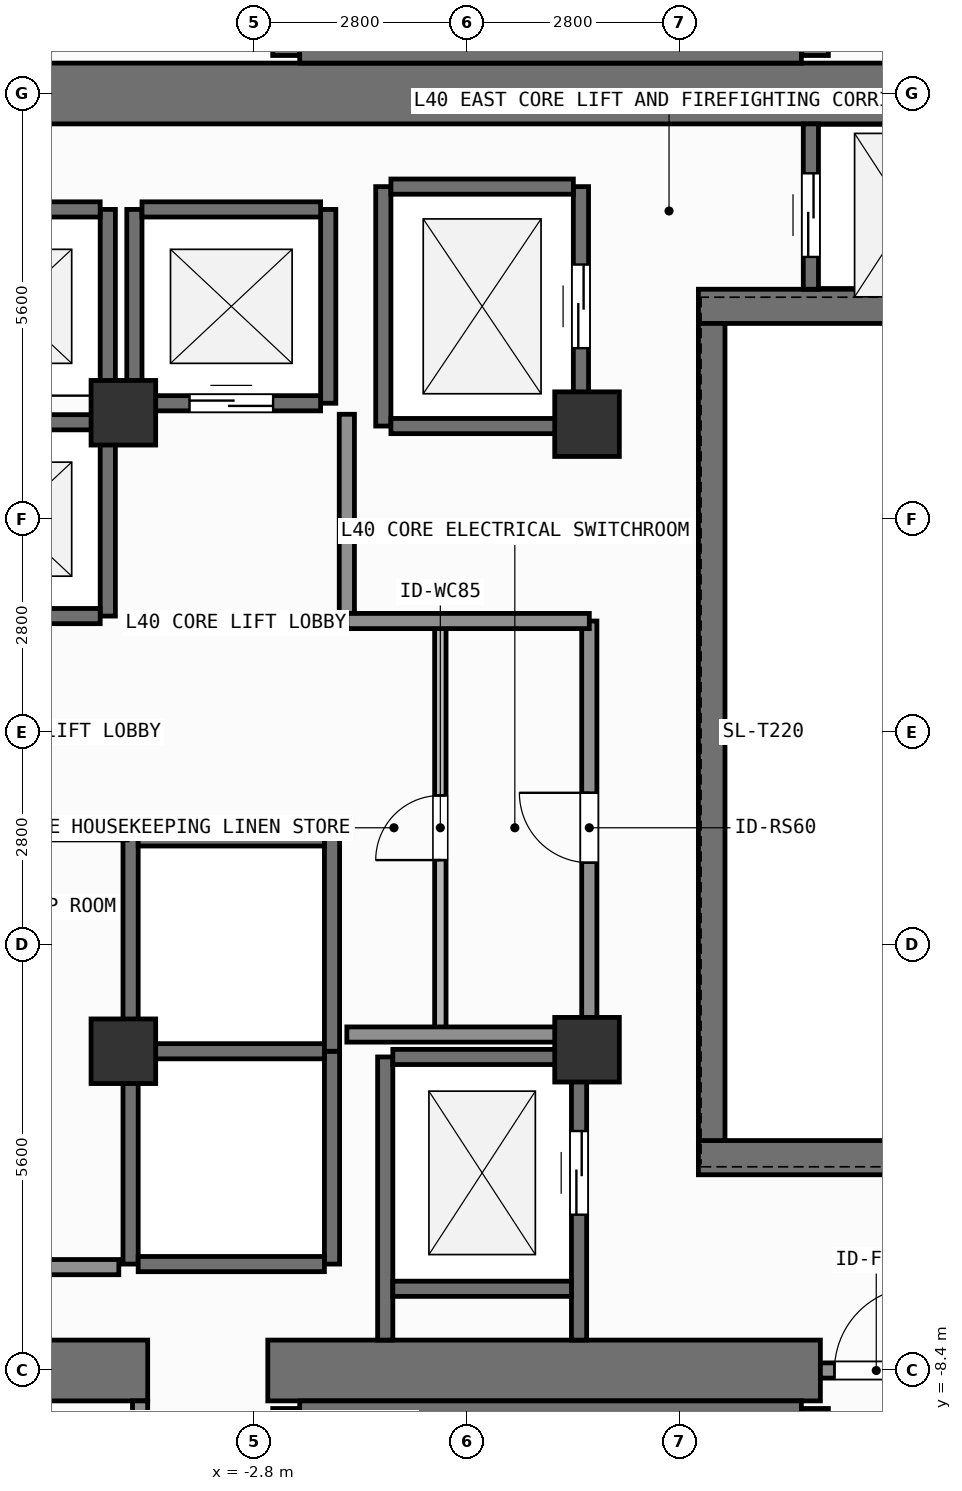
"""IFC4 building model, lengths in metres.
Left out: names, types, materials, properties, quantities, classifications, styles, units other than length and angle.
Written with IfcOpenShell. Run it as: python <this file> out.ifc"""

import sys

from ifc_helpers import new_model, si_unit, direction, frame, frame_2d, origin, origin_2d, place, context, subcontext, project, spatial, rectangle, extrude, element, fill, save


model = new_model("IFC4")
c1 = context("Model", 3, precision=1e-05, world=origin(), true_north=direction((0.0, 1.0)))
c2 = subcontext(c1, "Body", "Model", "MODEL_VIEW")
j1 = project(units=[si_unit("LENGTHUNIT", "METRE"), si_unit("PLANEANGLEUNIT", "RADIAN")], contexts=[c1])
p1 = place(None, origin())
s1 = spatial("IfcSite", under=j1, at=p1, CompositionType="ELEMENT")
p2 = place(p1, origin())
s2 = spatial("IfcBuilding", under=s1, at=p2, CompositionType="ELEMENT")
p3 = place(p2, frame((0.0, 0.0, 164.1)))
s3 = spatial("IfcBuildingStorey", under=s2, at=p3, CompositionType="ELEMENT", Elevation=164.1)
p4 = place(p3, frame((-7.55, -8.4, 0.0), z_axis=(0.0, 0.0, 1.0), x_axis=(1.0, 0.0, 0.0)))
e1 = element("IfcWall", 1, at=p4, inside=s3, PredefinedType="SHEAR", context=c2, shape_type="SweptSolid", body=[
    extrude(rectangle(XDim=3.35, YDim=0.8, at=frame_2d((1.675, 0.0))), origin(), (0.0, 0.0, 1.0), 3.9),
])
p5 = place(p3, frame((-2.62, -8.4, 0.0), z_axis=(0.0, 0.0, 1.0), x_axis=(1.0, 0.0, 0.0)))
e2 = element("IfcWall", 2, at=p5, inside=s3, PredefinedType="SHEAR", context=c2, shape_type="SweptSolid", body=[
    extrude(rectangle(XDim=7.27, YDim=0.8, at=frame_2d((3.635, 0.0))), origin(), (0.0, 0.0, 1.0), 3.9),
])
p6 = place(p3, frame((-7.55, 8.4, 0.0), z_axis=(0.0, 0.0, 1.0), x_axis=(1.0, 0.0, 0.0)))
e3 = element("IfcWall", 3, at=p6, inside=s3, PredefinedType="SHEAR", context=c2, shape_type="SweptSolid", body=[
    extrude(rectangle(XDim=16.35, YDim=0.8, at=frame_2d((8.175, 0.0))), origin(), (0.0, 0.0, 1.0), 3.9),
])
for number, where, z_axis, x_axis in (
    (4, (3.045, -5.6, 0.0), (0.0, 0.0, 1.0), (1.0, 0.0, 0.0)),
    (5, (3.045, 5.6, 0.0), (0.0, 0.0, 1.0), (1.0, 0.0, 0.0)),
):
    element("IfcWall", number, at=place(p3, frame(where, z_axis=z_axis, x_axis=x_axis)), inside=s3, PredefinedType="SHEAR", context=c2, shape_type="SweptSolid", body=[
        extrude(rectangle(XDim=5.755, YDim=0.45, at=frame_2d((2.877, 0.0))), origin(), (0.0, 0.0, 1.0), 3.9),
    ])
p7 = place(p3, frame((3.22, -5.375, 0.0), z_axis=(0.0, 0.0, 1.0), x_axis=(0.0, 1.0, 0.0)))
e6 = element("IfcWall", 6, at=p7, inside=s3, PredefinedType="SHEAR", context=c2, shape_type="SweptSolid", body=[
    extrude(rectangle(XDim=10.75, YDim=0.35, at=frame_2d((5.375, 0.0))), origin(), (0.0, 0.0, 1.0), 3.9),
])
p8 = place(p3, frame((-2.2, -8.913, 0.0), z_axis=(0.0, 0.0, 1.0), x_axis=(1.0, 0.0, 0.0)))
e7 = element("IfcWall", 7, at=p8, inside=s3, PredefinedType="SHEAR", context=c2, shape_type="SweptSolid", body=[
    extrude(rectangle(XDim=6.6, YDim=0.225, at=frame_2d((3.3, 0.0))), origin(), (0.0, 0.0, 1.0), 3.9),
])
p9 = place(p3, frame((-2.38, -11.825, 0.0), z_axis=(0.0, 0.0, 1.0), x_axis=(0.0, 1.0, 0.0)))
e8 = element("IfcWall", 8, at=p9, inside=s3, PredefinedType="SHEAR", context=c2, shape_type="SweptSolid", body=[
    extrude(rectangle(XDim=2.925, YDim=0.35, at=frame_2d((1.462, 0.0))), origin(), (0.0, 0.0, 1.0), 3.9),
])
p10 = place(p3, frame((4.58, -8.9, 0.0), z_axis=(0.0, 0.0, 1.0), x_axis=(0.0, -1.0, 0.0)))
e9 = element("IfcWall", 9, at=p10, inside=s3, PredefinedType="SHEAR", context=c2, shape_type="SweptSolid", body=[
    extrude(rectangle(XDim=2.925, YDim=0.35, at=frame_2d((1.462, 0.0))), origin(), (0.0, 0.0, 1.0), 3.9),
])
p11 = place(p10, frame((0.913, 0.0, 0.0)))
e10 = element("IfcOpeningElement", 10, at=p11, cuts=e9, PredefinedType="OPENING", context=c2, shape_type="SweptSolid", body=[
    extrude(rectangle(XDim=1.1, YDim=2.15, at=frame_2d((0.55, 1.075))), frame((0.0, 0.185, 0.0), z_axis=(0.0, -1.0, 0.0), x_axis=(1.0, 0.0, 0.0)), (0.0, 0.0, 1.0), 0.37),
])
p12 = place(p3, frame((-2.2, 8.913, 0.0), z_axis=(0.0, 0.0, 1.0), x_axis=(1.0, 0.0, 0.0)))
e11 = element("IfcWall", 11, at=p12, inside=s3, PredefinedType="SHEAR", context=c2, shape_type="SweptSolid", body=[
    extrude(rectangle(XDim=6.6, YDim=0.225, at=frame_2d((3.3, 0.0))), origin(), (0.0, 0.0, 1.0), 3.9),
])
p13 = place(p3, frame((-2.38, 8.9, 0.0), z_axis=(0.0, 0.0, 1.0), x_axis=(0.0, 1.0, 0.0)))
e12 = element("IfcWall", 12, at=p13, inside=s3, PredefinedType="SHEAR", context=c2, shape_type="SweptSolid", body=[
    extrude(rectangle(XDim=2.925, YDim=0.35, at=frame_2d((1.462, 0.0))), origin(), (0.0, 0.0, 1.0), 3.9),
])
p14 = place(p3, frame((4.58, 11.825, 0.0), z_axis=(0.0, 0.0, 1.0), x_axis=(0.0, -1.0, 0.0)))
e13 = element("IfcWall", 13, at=p14, inside=s3, PredefinedType="SHEAR", context=c2, shape_type="SweptSolid", body=[
    extrude(rectangle(XDim=2.925, YDim=0.35, at=frame_2d((1.462, 0.0))), origin(), (0.0, 0.0, 1.0), 3.9),
])
p15 = place(p14, frame((0.913, 0.0, 0.0)))
e14 = element("IfcOpeningElement", 14, at=p15, cuts=e13, PredefinedType="OPENING", context=c2, shape_type="SweptSolid", body=[
    extrude(rectangle(XDim=1.1, YDim=2.15, at=frame_2d((0.55, 1.075))), frame((0.0, 0.185, 0.0), z_axis=(0.0, -1.0, 0.0), x_axis=(1.0, 0.0, 0.0)), (0.0, 0.0, 1.0), 0.37),
])
for number, where, z_axis, x_axis in (
    (15, (-4.52, -4.2, 0.0), (0.0, 0.0, 1.0), (1.0, 0.0, 0.0)),
    (16, (1.58, -4.18, 0.0), (0.0, 0.0, 1.0), (1.0, 0.0, 0.0)),
    (17, (1.58, 4.05, 0.0), (0.0, 0.0, 1.0), (1.0, 0.0, 0.0)),
    (18, (-4.52, 4.2, 0.0), (0.0, 0.0, 1.0), (1.0, 0.0, 0.0)),
):
    element("IfcColumn", number, at=place(p3, frame(where, z_axis=z_axis, x_axis=x_axis)), inside=s3, PredefinedType="COLUMN", context=c2, shape_type="SweptSolid", body=[
        extrude(rectangle(XDim=0.85, YDim=0.85, at=origin_2d()), origin(), (0.0, 0.0, 1.0), 3.9),
    ])
p16 = place(p3, frame((-4.725, 1.525, 0.0), z_axis=(0.0, 0.0, 1.0), x_axis=(0.0, 1.0, 0.0)))
e19 = element("IfcWall", 19, at=p16, inside=s3, PredefinedType="SHEAR", context=c2, shape_type="SweptSolid", body=[
    extrude(rectangle(XDim=2.55, YDim=0.2, at=frame_2d((1.275, 0.0))), origin(), (0.0, 0.0, 1.0), 3.62),
])
for number, where, z_axis, x_axis in (
    (20, (-7.175, 1.525, 0.0), (0.0, 0.0, 1.0), (1.0, 0.0, 0.0)),
    (21, (-7.175, 4.075, 0.0), (0.0, 0.0, 1.0), (1.0, 0.0, 0.0)),
):
    element("IfcWall", number, at=place(p3, frame(where, z_axis=z_axis, x_axis=x_axis)), inside=s3, PredefinedType="SHEAR", context=c2, shape_type="SweptSolid", body=[
        extrude(rectangle(XDim=2.35, YDim=0.2, at=frame_2d((1.175, 0.0))), origin(), (0.0, 0.0, 1.0), 3.62),
    ])
p17 = place(p3, frame((-4.725, 4.075, 0.0), z_axis=(0.0, 0.0, 1.0), x_axis=(0.0, 1.0, 0.0)))
e22 = element("IfcWall", 22, at=p17, inside=s3, PredefinedType="SHEAR", context=c2, shape_type="SweptSolid", body=[
    extrude(rectangle(XDim=2.8, YDim=0.2, at=frame_2d((1.4, 0.0))), origin(), (0.0, 0.0, 1.0), 3.62),
])
p18 = place(p3, frame((-7.175, 6.875, 0.0), z_axis=(0.0, 0.0, 1.0), x_axis=(1.0, 0.0, 0.0)))
e23 = element("IfcWall", 23, at=p18, inside=s3, PredefinedType="SHEAR", context=c2, shape_type="SweptSolid", body=[
    extrude(rectangle(XDim=2.35, YDim=0.2, at=frame_2d((1.175, 0.0))), origin(), (0.0, 0.0, 1.0), 3.62),
])
for number, where, z_axis, x_axis in (
    (24, (-4.375, 4.325, 0.0), (0.0, 0.0, 1.0), (0.0, 1.0, 0.0)),
    (25, (-1.825, 4.325, 0.0), (0.0, 0.0, 1.0), (0.0, 1.0, 0.0)),
):
    element("IfcWall", number, at=place(p3, frame(where, z_axis=z_axis, x_axis=x_axis)), inside=s3, PredefinedType="SHEAR", context=c2, shape_type="SweptSolid", body=[
        extrude(rectangle(XDim=2.55, YDim=0.2, at=frame_2d((1.275, 0.0))), origin(), (0.0, 0.0, 1.0), 3.62),
    ])
p19 = place(p3, frame((-4.275, 4.325, 0.0), z_axis=(0.0, 0.0, 1.0), x_axis=(1.0, 0.0, 0.0)))
e26 = element("IfcWall", 26, at=p19, inside=s3, PredefinedType="SHEAR", context=c2, shape_type="SweptSolid", body=[
    extrude(rectangle(XDim=2.35, YDim=0.2, at=frame_2d((1.175, 0.0))), origin(), (0.0, 0.0, 1.0), 3.62),
])
p20 = place(p19, frame((0.625, 0.0, 0.0)))
e27 = element("IfcOpeningElement", 27, at=p20, cuts=e26, PredefinedType="OPENING", context=c2, shape_type="SweptSolid", body=[
    extrude(rectangle(XDim=1.1, YDim=2.2, at=frame_2d((0.55, 1.1))), frame((0.0, 0.11, 0.0), z_axis=(0.0, -1.0, 0.0), x_axis=(1.0, 0.0, 0.0)), (0.0, 0.0, 1.0), 0.22),
])
p21 = place(p3, frame((-4.275, 6.875, 0.0), z_axis=(0.0, 0.0, 1.0), x_axis=(1.0, 0.0, 0.0)))
e28 = element("IfcWall", 28, at=p21, inside=s3, PredefinedType="SHEAR", context=c2, shape_type="SweptSolid", body=[
    extrude(rectangle(XDim=2.35, YDim=0.2, at=frame_2d((1.175, 0.0))), origin(), (0.0, 0.0, 1.0), 3.62),
])
for number, where, z_axis, x_axis in (
    (29, (-4.425, -7.0, 0.0), (0.0, 0.0, 1.0), (0.0, 1.0, 0.0)),
    (30, (-1.775, -7.0, 0.0), (0.0, 0.0, 1.0), (0.0, 1.0, 0.0)),
):
    element("IfcWall", number, at=place(p3, frame(where, z_axis=z_axis, x_axis=x_axis)), inside=s3, PredefinedType="SHEAR", context=c2, shape_type="SweptSolid", body=[
        extrude(rectangle(XDim=2.8, YDim=0.2, at=frame_2d((1.4, 0.0))), origin(), (0.0, 0.0, 1.0), 3.62),
    ])
for number, where, z_axis, x_axis in (
    (31, (-4.325, -7.0, 0.0), (0.0, 0.0, 1.0), (1.0, 0.0, 0.0)),
    (32, (-4.325, -4.2, 0.0), (0.0, 0.0, 1.0), (1.0, 0.0, 0.0)),
):
    element("IfcWall", number, at=place(p3, frame(where, z_axis=z_axis, x_axis=x_axis)), inside=s3, PredefinedType="SHEAR", context=c2, shape_type="SweptSolid", body=[
        extrude(rectangle(XDim=2.45, YDim=0.2, at=frame_2d((1.225, 0.0))), origin(), (0.0, 0.0, 1.0), 3.62),
    ])
for number, where, z_axis, x_axis in (
    (33, (-4.425, -4.2, 0.0), (0.0, 0.0, 1.0), (0.0, 1.0, 0.0)),
    (34, (-1.775, -4.2, 0.0), (0.0, 0.0, 1.0), (0.0, 1.0, 0.0)),
):
    element("IfcWall", number, at=place(p3, frame(where, z_axis=z_axis, x_axis=x_axis)), inside=s3, PredefinedType="SHEAR", context=c2, shape_type="SweptSolid", body=[
        extrude(rectangle(XDim=2.8, YDim=0.2, at=frame_2d((1.4, 0.0))), origin(), (0.0, 0.0, 1.0), 3.62),
    ])
p22 = place(p3, frame((-4.325, -1.4, 0.0), z_axis=(0.0, 0.0, 1.0), x_axis=(1.0, 0.0, 0.0)))
e35 = element("IfcWall", 35, at=p22, inside=s3, PredefinedType="SHEAR", context=c2, shape_type="SweptSolid", body=[
    extrude(rectangle(XDim=2.45, YDim=0.2, at=frame_2d((1.225, 0.0))), origin(), (0.0, 0.0, 1.0), 3.62),
])
p23 = place(p3, frame((-1.1, 4.025, 0.0), z_axis=(0.0, 0.0, 1.0), x_axis=(0.0, 1.0, 0.0)))
e36 = element("IfcWall", 36, at=p23, inside=s3, PredefinedType="SHEAR", context=c2, shape_type="SweptSolid", body=[
    extrude(rectangle(XDim=3.15, YDim=0.2, at=frame_2d((1.575, 0.0))), origin(), (0.0, 0.0, 1.0), 3.62),
])
p24 = place(p3, frame((1.5, 4.025, 0.0), z_axis=(0.0, 0.0, 1.0), x_axis=(0.0, 1.0, 0.0)))
e37 = element("IfcWall", 37, at=p24, inside=s3, PredefinedType="SHEAR", context=c2, shape_type="SweptSolid", body=[
    extrude(rectangle(XDim=3.15, YDim=0.2, at=frame_2d((1.575, 0.0))), origin(), (0.0, 0.0, 1.0), 3.62),
])
p25 = place(p24, frame((1.025, 0.0, 0.0)))
e38 = element("IfcOpeningElement", 38, at=p25, cuts=e37, PredefinedType="OPENING", context=c2, shape_type="SweptSolid", body=[
    extrude(rectangle(XDim=1.1, YDim=2.2, at=frame_2d((0.55, 1.1))), frame((0.0, 0.11, 0.0), z_axis=(0.0, -1.0, 0.0), x_axis=(1.0, 0.0, 0.0)), (0.0, 0.0, 1.0), 0.22),
])
for number, where, z_axis, x_axis in (
    (39, (-1.0, 4.025, 0.0), (0.0, 0.0, 1.0), (1.0, 0.0, 0.0)),
    (40, (-1.0, 7.175, 0.0), (0.0, 0.0, 1.0), (1.0, 0.0, 0.0)),
):
    element("IfcWall", number, at=place(p3, frame(where, z_axis=z_axis, x_axis=x_axis)), inside=s3, PredefinedType="SHEAR", context=c2, shape_type="SweptSolid", body=[
        extrude(rectangle(XDim=2.4, YDim=0.2, at=frame_2d((1.2, 0.0))), origin(), (0.0, 0.0, 1.0), 3.62),
    ])
p26 = place(p3, frame((-1.075, -8.0, 0.0), z_axis=(0.0, 0.0, 1.0), x_axis=(0.0, 1.0, 0.0)))
e41 = element("IfcWall", 41, at=p26, inside=s3, PredefinedType="SHEAR", context=c2, shape_type="SweptSolid", body=[
    extrude(rectangle(XDim=3.725, YDim=0.2, at=frame_2d((1.863, 0.0))), origin(), (0.0, 0.0, 1.0), 3.62),
])
p27 = place(p3, frame((1.475, -8.0, 0.0), z_axis=(0.0, 0.0, 1.0), x_axis=(0.0, 1.0, 0.0)))
e42 = element("IfcWall", 42, at=p27, inside=s3, PredefinedType="SHEAR", context=c2, shape_type="SweptSolid", body=[
    extrude(rectangle(XDim=3.725, YDim=0.2, at=frame_2d((1.863, 0.0))), origin(), (0.0, 0.0, 1.0), 3.62),
])
p28 = place(p27, frame((1.65, 0.0, 0.0)))
e43 = element("IfcOpeningElement", 43, at=p28, cuts=e42, PredefinedType="OPENING", context=c2, shape_type="SweptSolid", body=[
    extrude(rectangle(XDim=1.1, YDim=2.2, at=frame_2d((0.55, 1.1))), frame((0.0, 0.11, 0.0), z_axis=(0.0, -1.0, 0.0), x_axis=(1.0, 0.0, 0.0)), (0.0, 0.0, 1.0), 0.22),
])
for number, where, z_axis, x_axis in (
    (44, (-0.975, -7.325, 0.0), (0.0, 0.0, 1.0), (1.0, 0.0, 0.0)),
    (45, (-0.975, -4.275, 0.0), (0.0, 0.0, 1.0), (1.0, 0.0, 0.0)),
):
    element("IfcWall", number, at=place(p3, frame(where, z_axis=z_axis, x_axis=x_axis)), inside=s3, PredefinedType="SHEAR", context=c2, shape_type="SweptSolid", body=[
        extrude(rectangle(XDim=2.35, YDim=0.2, at=frame_2d((1.175, 0.0))), origin(), (0.0, 0.0, 1.0), 3.62),
    ])
p29 = place(p3, frame((4.525, 5.825, 0.0), z_axis=(0.0, 0.0, 1.0), x_axis=(0.0, 1.0, 0.0)))
e46 = element("IfcWall", 46, at=p29, inside=s3, PredefinedType="SHEAR", context=c2, shape_type="SweptSolid", body=[
    extrude(rectangle(XDim=2.175, YDim=0.2, at=frame_2d((1.087, 0.0))), origin(), (0.0, 0.0, 1.0), 3.62),
])
p30 = place(p29, frame((0.425, 0.0, 0.0)))
e47 = element("IfcOpeningElement", 47, at=p30, cuts=e46, PredefinedType="OPENING", context=c2, shape_type="SweptSolid", body=[
    extrude(rectangle(XDim=1.1, YDim=2.2, at=frame_2d((0.55, 1.1))), frame((0.0, 0.11, 0.0), z_axis=(0.0, -1.0, 0.0), x_axis=(1.0, 0.0, 0.0)), (0.0, 0.0, 1.0), 0.22),
])
p31 = place(p3, frame((4.65, -8.4, 0.0), z_axis=(0.0, 0.0, 1.0), x_axis=(1.0, 0.0, 0.0)))
e48 = element("IfcWall", 48, at=p31, inside=s3, PredefinedType="SOLIDWALL", context=c2, shape_type="SweptSolid", body=[
    extrude(rectangle(XDim=1.47, YDim=0.2, at=frame_2d((0.735, 0.0))), origin(), (0.0, 0.0, 1.0), 2.76),
])
p32 = place(p31, frame((0.185, 0.0, 0.0)))
e49 = element("IfcOpeningElement", 49, at=p32, cuts=e48, PredefinedType="OPENING", context=c2, shape_type="SweptSolid", body=[
    extrude(rectangle(XDim=1.1, YDim=2.15, at=frame_2d((0.55, 1.075))), frame((0.0, 0.11, 0.0), z_axis=(0.0, -1.0, 0.0), x_axis=(1.0, 0.0, 0.0)), (0.0, 0.0, 1.0), 0.22),
])
p33 = place(p3, frame((-0.35, -3.98, 0.0), z_axis=(0.0, 0.0, 1.0), x_axis=(0.0, 1.0, 0.0)))
e50 = element("IfcWall", 50, at=p33, inside=s3, PredefinedType="PARTITIONING", context=c2, shape_type="SweptSolid", body=[
    extrude(rectangle(XDim=5.44, YDim=0.15, at=frame_2d((2.72, 0.0))), origin(), (0.0, 0.0, 1.0), 3.62),
])
p34 = place(p33, frame((2.295, 0.0, 0.0)))
e51 = element("IfcOpeningElement", 51, at=p34, cuts=e50, PredefinedType="OPENING", context=c2, shape_type="SweptSolid", body=[
    extrude(rectangle(XDim=0.85, YDim=2.1, at=frame_2d((0.425, 1.05))), frame((0.0, 0.085, 0.0), z_axis=(0.0, -1.0, 0.0), x_axis=(1.0, 0.0, 0.0)), (0.0, 0.0, 1.0), 0.17),
])
p35 = place(p3, frame((1.61, -3.98, 0.0), z_axis=(0.0, 0.0, 1.0), x_axis=(0.0, 1.0, 0.0)))
e52 = element("IfcWall", 52, at=p35, inside=s3, PredefinedType="SOLIDWALL", context=c2, shape_type="SweptSolid", body=[
    extrude(rectangle(XDim=5.44, YDim=0.2, at=frame_2d((2.72, 0.0))), origin(), (0.0, 0.0, 1.0), 3.62),
])
p36 = place(p35, frame((2.26, 0.0, 0.0)))
e53 = element("IfcOpeningElement", 53, at=p36, cuts=e52, PredefinedType="OPENING", context=c2, shape_type="SweptSolid", body=[
    extrude(rectangle(XDim=0.92, YDim=2.1, at=frame_2d((0.46, 1.05))), frame((0.0, 0.11, 0.0), z_axis=(0.0, -1.0, 0.0), x_axis=(1.0, 0.0, 0.0)), (0.0, 0.0, 1.0), 0.22),
])
p37 = place(p3, frame((-4.3, -12.06, 0.0), z_axis=(0.0, 0.0, 1.0), x_axis=(0.0, 1.0, 0.0)))
e54 = element("IfcWall", 54, at=p37, inside=s3, PredefinedType="SOLIDWALL", context=c2, shape_type="SweptSolid", body=[
    extrude(rectangle(XDim=3.26, YDim=0.2, at=frame_2d((1.63, 0.0))), origin(), (0.0, 0.0, 1.0), 3.62),
])
p38 = place(p3, frame((-7.38, -1.32, 0.0), z_axis=(0.0, 0.0, 1.0), x_axis=(1.0, 0.0, 0.0)))
e55 = element("IfcWall", 55, at=p38, inside=s3, PredefinedType="SOLIDWALL", context=c2, shape_type="SweptSolid", body=[
    extrude(rectangle(XDim=2.91, YDim=0.2, at=frame_2d((1.455, 0.0))), origin(), (0.0, 0.0, 1.0), 3.62),
])
p39 = place(p3, frame((-1.58, 1.48, 0.0), z_axis=(0.0, 0.0, 1.0), x_axis=(0.0, 1.0, 0.0)))
e56 = element("IfcWall", 56, at=p39, inside=s3, PredefinedType="SOLIDWALL", context=c2, shape_type="SweptSolid", body=[
    extrude(rectangle(XDim=2.7, YDim=0.2, at=frame_2d((1.35, 0.0))), origin(), (0.0, 0.0, 1.0), 3.62),
])
for number, where, z_axis, x_axis in (
    (57, (-1.58, -3.98, 0.0), (0.0, 0.0, 1.0), (1.0, 0.0, 0.0)),
    (58, (-1.58, 1.46, 0.0), (0.0, 0.0, 1.0), (1.0, 0.0, 0.0)),
):
    element("IfcWall", number, at=place(p3, frame(where, z_axis=z_axis, x_axis=x_axis)), inside=s3, PredefinedType="SOLIDWALL", context=c2, shape_type="SweptSolid", body=[
        extrude(rectangle(XDim=3.19, YDim=0.2, at=frame_2d((1.595, 0.0))), origin(), (0.0, 0.0, 1.0), 3.62),
    ])
p40 = place(p3, frame((-7.38, -7.04, 0.0), z_axis=(0.0, 0.0, 1.0), x_axis=(1.0, 0.0, 0.0)))
e59 = element("IfcWall", 59, at=p40, inside=s3, PredefinedType="SOLIDWALL", context=c2, shape_type="SweptSolid", body=[
    extrude(rectangle(XDim=2.8, YDim=0.2, at=frame_2d((1.4, 0.0))), origin(), (0.0, 0.0, 1.0), 3.62),
])
p41 = place(p20, origin())
e60 = element("IfcDoor", 60, at=p41, inside=s3, OperationType="SLIDING_TO_LEFT", PredefinedType="DOOR", context=c2, shape_type="SweptSolid", body=[
    extrude(rectangle(XDim=1.1, YDim=2.2, at=frame_2d((0.55, 1.1))), frame((0.0, 0.025, 0.0), z_axis=(0.0, -1.0, 0.0), x_axis=(1.0, 0.0, 0.0)), (0.0, 0.0, 1.0), 0.05),
])
fill(e27, e60)
p42 = place(p25, origin())
e61 = element("IfcDoor", 61, at=p42, inside=s3, OperationType="SLIDING_TO_LEFT", PredefinedType="DOOR", context=c2, shape_type="SweptSolid", body=[
    extrude(rectangle(XDim=1.1, YDim=2.2, at=frame_2d((0.55, 1.1))), frame((0.0, 0.025, 0.0), z_axis=(0.0, -1.0, 0.0), x_axis=(1.0, 0.0, 0.0)), (0.0, 0.0, 1.0), 0.05),
])
fill(e38, e61)
p43 = place(p28, origin())
e62 = element("IfcDoor", 62, at=p43, inside=s3, OperationType="SLIDING_TO_LEFT", PredefinedType="DOOR", context=c2, shape_type="SweptSolid", body=[
    extrude(rectangle(XDim=1.1, YDim=2.2, at=frame_2d((0.55, 1.1))), frame((0.0, 0.025, 0.0), z_axis=(0.0, -1.0, 0.0), x_axis=(1.0, 0.0, 0.0)), (0.0, 0.0, 1.0), 0.05),
])
fill(e43, e62)
p44 = place(p30, origin())
e63 = element("IfcDoor", 63, at=p44, inside=s3, OperationType="SLIDING_TO_LEFT", PredefinedType="DOOR", context=c2, shape_type="SweptSolid", body=[
    extrude(rectangle(XDim=1.1, YDim=2.2, at=frame_2d((0.55, 1.1))), frame((0.0, 0.025, 0.0), z_axis=(0.0, -1.0, 0.0), x_axis=(1.0, 0.0, 0.0)), (0.0, 0.0, 1.0), 0.05),
])
fill(e47, e63)
p45 = place(p32, origin())
e64 = element("IfcDoor", 64, at=p45, inside=s3, OperationType="SINGLE_SWING_RIGHT", PredefinedType="DOOR", context=c2, shape_type="SweptSolid", body=[
    extrude(rectangle(XDim=1.1, YDim=2.15, at=frame_2d((0.55, 1.075))), frame((0.0, 0.025, 0.0), z_axis=(0.0, -1.0, 0.0), x_axis=(1.0, 0.0, 0.0)), (0.0, 0.0, 1.0), 0.05),
])
fill(e49, e64)
p46 = place(p34, origin())
e65 = element("IfcDoor", 65, at=p46, inside=s3, OperationType="SINGLE_SWING_LEFT", PredefinedType="DOOR", context=c2, shape_type="SweptSolid", body=[
    extrude(rectangle(XDim=0.85, YDim=2.1, at=frame_2d((0.425, 1.05))), frame((0.0, 0.025, 0.0), z_axis=(0.0, -1.0, 0.0), x_axis=(1.0, 0.0, 0.0)), (0.0, 0.0, 1.0), 0.05),
])
fill(e51, e65)
p47 = place(p36, origin())
e66 = element("IfcDoor", 66, at=p47, inside=s3, OperationType="SINGLE_SWING_RIGHT", PredefinedType="DOOR", context=c2, shape_type="SweptSolid", body=[
    extrude(rectangle(XDim=0.92, YDim=2.1, at=frame_2d((0.46, 1.05))), frame((0.0, 0.025, 0.0), z_axis=(0.0, -1.0, 0.0), x_axis=(1.0, 0.0, 0.0)), (0.0, 0.0, 1.0), 0.05),
])
fill(e53, e66)
save(model, sys.argv[1])
